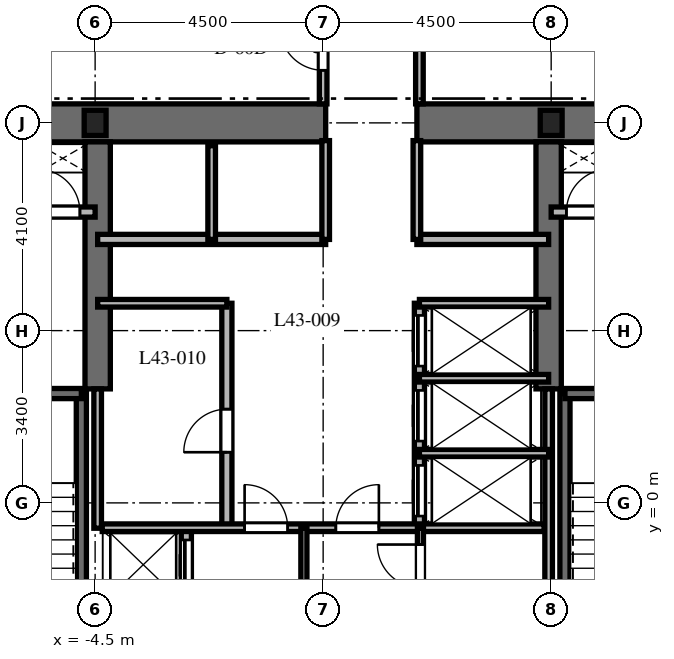
"""IFC4 building model, lengths in metres.
Left out: names, types, materials, properties, quantities, classifications, styles, units other than length and angle.
Written with IfcOpenShell. Run it as: python <this file> out.ifc"""

import sys

from ifc_helpers import new_model, si_unit, direction, frame, frame_2d, origin, origin_2d, place, context, subcontext, project, spatial, rectangle, i_section, extrude, element, fill, save


model = new_model("IFC4")
c1 = context("Model", 3, precision=1e-05, world=origin(), true_north=direction((0.0, 1.0)))
c2 = subcontext(c1, "Body", "Model", "MODEL_VIEW")
j1 = project(units=[si_unit("LENGTHUNIT", "METRE"), si_unit("PLANEANGLEUNIT", "RADIAN")], contexts=[c1])
p1 = place(None, origin())
s1 = spatial("IfcSite", under=j1, at=p1, CompositionType="ELEMENT")
p2 = place(p1, origin())
s2 = spatial("IfcBuilding", under=s1, at=p2, CompositionType="ELEMENT")
p3 = place(p2, frame((0.0, 0.0, 175.6)))
s3 = spatial("IfcBuildingStorey", under=s2, at=p3, CompositionType="ELEMENT", Elevation=175.6)
p4 = place(p3, frame((-9.375, 7.5, 0.0), z_axis=(0.0, 0.0, 1.0), x_axis=(1.0, 0.0, 0.0)))
e1 = element("IfcWall", 1, at=p4, inside=s3, PredefinedType="SHEAR", context=c2, shape_type="SweptSolid", body=[
    extrude(rectangle(XDim=9.425, YDim=0.75, at=frame_2d((4.712, 0.0))), origin(), (0.0, 0.0, 1.0), 3.7),
])
p5 = place(p3, frame((1.85, 7.5, 0.0), z_axis=(0.0, 0.0, 1.0), x_axis=(1.0, 0.0, 0.0)))
e2 = element("IfcWall", 2, at=p5, inside=s3, PredefinedType="SHEAR", context=c2, shape_type="SweptSolid", body=[
    extrude(rectangle(XDim=7.525, YDim=0.75, at=frame_2d((3.762, 0.0))), origin(), (0.0, 0.0, 1.0), 3.7),
])
for number, where, z_axis, x_axis in (
    (3, (-4.45, 2.25, 0.0), (0.0, 0.0, 1.0), (0.0, 1.0, 0.0)),
    (4, (4.45, 2.25, 0.0), (0.0, 0.0, 1.0), (0.0, 1.0, 0.0)),
):
    element("IfcWall", number, at=place(p3, frame(where, z_axis=z_axis, x_axis=x_axis)), inside=s3, PredefinedType="SHEAR", context=c2, shape_type="SweptSolid", body=[
        extrude(rectangle(XDim=4.875, YDim=0.5, at=frame_2d((2.438, 0.0))), origin(), (0.0, 0.0, 1.0), 3.7),
    ])
p6 = place(p3, frame((-4.772, -6.985, 0.0), z_axis=(0.0, 0.0, 1.0), x_axis=(0.0, 1.0, 0.0)))
e5 = element("IfcWall", 5, at=p6, inside=s3, PredefinedType="SHEAR", context=c2, shape_type="SweptSolid", body=[
    extrude(rectangle(XDim=9.143, YDim=0.2, at=frame_2d((4.572, 0.0))), origin(), (0.0, 0.0, 1.0), 3.7),
])
p7 = place(p3, frame((-8.458, 2.158, 0.0), z_axis=(0.0, 0.0, 1.0), x_axis=(1.0, 0.0, 0.0)))
e6 = element("IfcWall", 6, at=p7, inside=s3, PredefinedType="SHEAR", context=c2, shape_type="SweptSolid", body=[
    extrude(rectangle(XDim=3.686, YDim=0.2, at=frame_2d((1.843, 0.0))), origin(), (0.0, 0.0, 1.0), 3.7),
])
p8 = place(p7, frame((1.3, 0.0, 0.0)))
e7 = element("IfcOpeningElement", 7, at=p8, cuts=e6, PredefinedType="OPENING", context=c2, shape_type="SweptSolid", body=[
    extrude(rectangle(XDim=1.0, YDim=2.15, at=frame_2d((0.5, 1.075))), frame((0.0, 0.11, 0.0), z_axis=(0.0, -1.0, 0.0), x_axis=(1.0, 0.0, 0.0)), (0.0, 0.0, 1.0), 0.22),
])
p9 = place(p3, frame((4.772, -6.985, 0.0), z_axis=(0.0, 0.0, 1.0), x_axis=(0.0, 1.0, 0.0)))
e8 = element("IfcWall", 8, at=p9, inside=s3, PredefinedType="SHEAR", context=c2, shape_type="SweptSolid", body=[
    extrude(rectangle(XDim=9.143, YDim=0.2, at=frame_2d((4.572, 0.0))), origin(), (0.0, 0.0, 1.0), 3.7),
])
p10 = place(p3, frame((4.772, 2.158, 0.0), z_axis=(0.0, 0.0, 1.0), x_axis=(1.0, 0.0, 0.0)))
e9 = element("IfcWall", 9, at=p10, inside=s3, PredefinedType="SHEAR", context=c2, shape_type="SweptSolid", body=[
    extrude(rectangle(XDim=3.686, YDim=0.2, at=frame_2d((1.843, 0.0))), origin(), (0.0, 0.0, 1.0), 3.7),
])
p11 = place(p10, frame((1.35, 0.0, 0.0)))
e10 = element("IfcOpeningElement", 10, at=p11, cuts=e9, PredefinedType="OPENING", context=c2, shape_type="SweptSolid", body=[
    extrude(rectangle(XDim=1.0, YDim=2.15, at=frame_2d((0.5, 1.075))), frame((0.0, 0.11, 0.0), z_axis=(0.0, -1.0, 0.0), x_axis=(1.0, 0.0, 0.0)), (0.0, 0.0, 1.0), 0.22),
])
for number, where, z_axis, x_axis in (
    (11, (4.5, 7.5, 0.0), (0.0, 0.0, 1.0), (1.0, 0.0, 0.0)),
    (12, (-4.5, 7.5, 0.0), (0.0, 0.0, 1.0), (1.0, 0.0, 0.0)),
):
    element("IfcColumn", number, at=place(p3, frame(where, z_axis=z_axis, x_axis=x_axis)), inside=s3, PredefinedType="COLUMN", context=c2, shape_type="SweptSolid", body=[
        extrude(i_section(OverallWidth=0.432, OverallDepth=0.498, WebThickness=0.056, FlangeThickness=0.089, at=origin_2d()), origin(), (0.0, 0.0, 1.0), 3.7),
    ])
p12 = place(p3, frame((-8.55, 5.74, 0.0), z_axis=(0.0, 0.0, 1.0), x_axis=(1.0, 0.0, 0.0)))
e13 = element("IfcWall", 13, at=p12, inside=s3, PredefinedType="PARTITIONING", context=c2, shape_type="SweptSolid", body=[
    extrude(rectangle(XDim=4.05, YDim=0.2, at=frame_2d((2.025, 0.0))), origin(), (0.0, 0.0, 1.0), 3.4),
])
p13 = place(p12, frame((0.75, 0.0, 0.0)))
e14 = element("IfcOpeningElement", 14, at=p13, cuts=e13, PredefinedType="OPENING", context=c2, shape_type="SweptSolid", body=[
    extrude(rectangle(XDim=1.1, YDim=2.2, at=frame_2d((0.55, 1.1))), frame((0.0, 0.11, 0.0), z_axis=(0.0, -1.0, 0.0), x_axis=(1.0, 0.0, 0.0)), (0.0, 0.0, 1.0), 0.22),
])
p14 = place(p12, frame((2.9, 0.0, 0.0)))
e15 = element("IfcOpeningElement", 15, at=p14, cuts=e13, PredefinedType="OPENING", context=c2, shape_type="SweptSolid", body=[
    extrude(rectangle(XDim=0.85, YDim=2.03, at=frame_2d((0.425, 1.015))), frame((0.0, 0.11, 0.0), z_axis=(0.0, -1.0, 0.0), x_axis=(1.0, 0.0, 0.0)), (0.0, 0.0, 1.0), 0.22),
])
p15 = place(p3, frame((4.5, 5.74, 0.0), z_axis=(0.0, 0.0, 1.0), x_axis=(1.0, 0.0, 0.0)))
e16 = element("IfcWall", 16, at=p15, inside=s3, PredefinedType="PARTITIONING", context=c2, shape_type="SweptSolid", body=[
    extrude(rectangle(XDim=4.05, YDim=0.2, at=frame_2d((2.025, 0.0))), origin(), (0.0, 0.0, 1.0), 3.4),
])
p16 = place(p15, frame((0.3, 0.0, 0.0)))
e17 = element("IfcOpeningElement", 17, at=p16, cuts=e16, PredefinedType="OPENING", context=c2, shape_type="SweptSolid", body=[
    extrude(rectangle(XDim=0.85, YDim=2.03, at=frame_2d((0.425, 1.015))), frame((0.0, 0.11, 0.0), z_axis=(0.0, -1.0, 0.0), x_axis=(1.0, 0.0, 0.0)), (0.0, 0.0, 1.0), 0.22),
])
p17 = place(p15, frame((2.15, 0.0, 0.0)))
e18 = element("IfcOpeningElement", 18, at=p17, cuts=e16, PredefinedType="OPENING", context=c2, shape_type="SweptSolid", body=[
    extrude(rectangle(XDim=1.1, YDim=2.2, at=frame_2d((0.55, 1.1))), frame((0.0, 0.11, 0.0), z_axis=(0.0, -1.0, 0.0), x_axis=(1.0, 0.0, 0.0)), (0.0, 0.0, 1.0), 0.22),
])
p18 = place(p3, frame((-2.7, -1.972, 0.0), z_axis=(0.0, 0.0, 1.0), x_axis=(0.0, 1.0, 0.0)))
e19 = element("IfcWall", 19, at=p18, inside=s3, PredefinedType="PARTITIONING", context=c2, shape_type="SweptSolid", body=[
    extrude(rectangle(XDim=1.472, YDim=0.2, at=frame_2d((0.736, 0.0))), origin(), (0.0, 0.0, 1.0), 3.4),
])
p19 = place(p18, frame((0.24, 0.0, 0.0)))
e20 = element("IfcOpeningElement", 20, at=p19, cuts=e19, PredefinedType="OPENING", context=c2, shape_type="SweptSolid", body=[
    extrude(rectangle(XDim=1.0, YDim=2.2, at=frame_2d((0.5, 1.1))), frame((0.0, 0.11, 0.0), z_axis=(0.0, -1.0, 0.0), x_axis=(1.0, 0.0, 0.0)), (0.0, 0.0, 1.0), 0.22),
])
p20 = place(p3, frame((-4.45, 5.2, 0.0), z_axis=(0.0, 0.0, 1.0), x_axis=(1.0, 0.0, 0.0)))
e21 = element("IfcWall", 21, at=p20, inside=s3, PredefinedType="PARTITIONING", context=c2, shape_type="SweptSolid", body=[
    extrude(rectangle(XDim=4.5, YDim=0.2, at=frame_2d((2.25, 0.0))), origin(), (0.0, 0.0, 1.0), 3.4),
])
p21 = place(p3, frame((1.85, 5.2, 0.0), z_axis=(0.0, 0.0, 1.0), x_axis=(1.0, 0.0, 0.0)))
e22 = element("IfcWall", 22, at=p21, inside=s3, PredefinedType="PARTITIONING", context=c2, shape_type="SweptSolid", body=[
    extrude(rectangle(XDim=2.6, YDim=0.2, at=frame_2d((1.3, 0.0))), origin(), (0.0, 0.0, 1.0), 3.4),
])
p22 = place(p3, frame((-2.2, 5.2, 0.0), z_axis=(0.0, 0.0, 1.0), x_axis=(0.0, 1.0, 0.0)))
e23 = element("IfcWall", 23, at=p22, inside=s3, PredefinedType="PARTITIONING", context=c2, shape_type="SweptSolid", body=[
    extrude(rectangle(XDim=1.85, YDim=0.15, at=frame_2d((0.925, 0.0))), origin(), (0.0, 0.0, 1.0), 3.4),
])
for number, where, z_axis, x_axis in (
    (24, (0.05, 5.2, 0.0), (0.0, 0.0, 1.0), (0.0, 1.0, 0.0)),
    (25, (1.85, 5.2, 0.0), (0.0, 0.0, 1.0), (0.0, 1.0, 0.0)),
):
    element("IfcWall", number, at=place(p3, frame(where, z_axis=z_axis, x_axis=x_axis)), inside=s3, PredefinedType="PARTITIONING", context=c2, shape_type="SweptSolid", body=[
        extrude(rectangle(XDim=1.95, YDim=0.15, at=frame_2d((0.975, 0.0))), origin(), (0.0, 0.0, 1.0), 3.4),
    ])
p23 = place(p3, frame((-4.45, -0.5, 0.0), z_axis=(0.0, 0.0, 1.0), x_axis=(0.0, 1.0, 0.0)))
e26 = element("IfcWall", 26, at=p23, inside=s3, PredefinedType="PARTITIONING", context=c2, shape_type="SweptSolid", body=[
    extrude(rectangle(XDim=2.75, YDim=0.15, at=frame_2d((1.375, 0.0))), origin(), (0.0, 0.0, 1.0), 3.4),
])
p24 = place(p3, frame((4.45, -1.972, 0.0), z_axis=(0.0, 0.0, 1.0), x_axis=(0.0, 1.0, 0.0)))
e27 = element("IfcWall", 27, at=p24, inside=s3, PredefinedType="PARTITIONING", context=c2, shape_type="SweptSolid", body=[
    extrude(rectangle(XDim=4.222, YDim=0.15, at=frame_2d((2.111, 0.0))), origin(), (0.0, 0.0, 1.0), 3.4),
])
p25 = place(p3, frame((-1.9, -0.5, 0.0), z_axis=(0.0, 0.0, 1.0), x_axis=(0.0, 1.0, 0.0)))
e28 = element("IfcWall", 28, at=p25, inside=s3, PredefinedType="PARTITIONING", context=c2, shape_type="SweptSolid", body=[
    extrude(rectangle(XDim=4.44, YDim=0.2, at=frame_2d((2.22, 0.0))), origin(), (0.0, 0.0, 1.0), 3.4),
])
p26 = place(p25, frame((1.5, 0.0, 0.0)))
e29 = element("IfcOpeningElement", 29, at=p26, cuts=e28, PredefinedType="OPENING", context=c2, shape_type="SweptSolid", body=[
    extrude(rectangle(XDim=0.85, YDim=2.03, at=frame_2d((0.425, 1.015))), frame((0.0, 0.11, 0.0), z_axis=(0.0, -1.0, 0.0), x_axis=(1.0, 0.0, 0.0)), (0.0, 0.0, 1.0), 0.22),
])
p27 = place(p3, frame((-4.45, 3.94, 0.0), z_axis=(0.0, 0.0, 1.0), x_axis=(1.0, 0.0, 0.0)))
e30 = element("IfcWall", 30, at=p27, inside=s3, PredefinedType="PARTITIONING", context=c2, shape_type="SweptSolid", body=[
    extrude(rectangle(XDim=2.55, YDim=0.15, at=frame_2d((1.275, 0.0))), origin(), (0.0, 0.0, 1.0), 3.4),
])
p28 = place(p3, frame((1.9, -0.5, 0.0), z_axis=(0.0, 0.0, 1.0), x_axis=(0.0, 1.0, 0.0)))
e31 = element("IfcWall", 31, at=p28, inside=s3, PredefinedType="PARTITIONING", context=c2, shape_type="SweptSolid", body=[
    extrude(rectangle(XDim=4.44, YDim=0.2, at=frame_2d((2.22, 0.0))), origin(), (0.0, 0.0, 1.0), 3.4),
])
p29 = place(p28, frame((0.24, 0.0, 0.0)))
e32 = element("IfcOpeningElement", 32, at=p29, cuts=e31, PredefinedType="OPENING", context=c2, shape_type="SweptSolid", body=[
    extrude(rectangle(XDim=1.0, YDim=2.2, at=frame_2d((0.5, 1.1))), frame((0.0, 0.11, 0.0), z_axis=(0.0, -1.0, 0.0), x_axis=(1.0, 0.0, 0.0)), (0.0, 0.0, 1.0), 0.22),
])
p30 = place(p28, frame((1.72, 0.0, 0.0)))
e33 = element("IfcOpeningElement", 33, at=p30, cuts=e31, PredefinedType="OPENING", context=c2, shape_type="SweptSolid", body=[
    extrude(rectangle(XDim=1.0, YDim=2.2, at=frame_2d((0.5, 1.1))), frame((0.0, 0.11, 0.0), z_axis=(0.0, -1.0, 0.0), x_axis=(1.0, 0.0, 0.0)), (0.0, 0.0, 1.0), 0.22),
])
p31 = place(p28, frame((3.2, 0.0, 0.0)))
e34 = element("IfcOpeningElement", 34, at=p31, cuts=e31, PredefinedType="OPENING", context=c2, shape_type="SweptSolid", body=[
    extrude(rectangle(XDim=1.0, YDim=2.2, at=frame_2d((0.5, 1.1))), frame((0.0, 0.11, 0.0), z_axis=(0.0, -1.0, 0.0), x_axis=(1.0, 0.0, 0.0)), (0.0, 0.0, 1.0), 0.22),
])
for number, where, z_axis, x_axis in (
    (35, (1.9, 3.94, 0.0), (0.0, 0.0, 1.0), (1.0, 0.0, 0.0)),
    (36, (1.9, 0.98, 0.0), (0.0, 0.0, 1.0), (1.0, 0.0, 0.0)),
    (37, (1.9, 2.46, 0.0), (0.0, 0.0, 1.0), (1.0, 0.0, 0.0)),
):
    element("IfcWall", number, at=place(p3, frame(where, z_axis=z_axis, x_axis=x_axis)), inside=s3, PredefinedType="PARTITIONING", context=c2, shape_type="SweptSolid", body=[
        extrude(rectangle(XDim=2.55, YDim=0.15, at=frame_2d((1.275, 0.0))), origin(), (0.0, 0.0, 1.0), 3.4),
    ])
p32 = place(p3, frame((-4.36, -0.49, 0.0), z_axis=(0.0, 0.0, 1.0), x_axis=(1.0, 0.0, 0.0)))
e38 = element("IfcWall", 38, at=p32, inside=s3, PredefinedType="PARTITIONING", context=c2, shape_type="SweptSolid", body=[
    extrude(rectangle(XDim=8.72, YDim=0.15, at=frame_2d((4.36, 0.0))), origin(), (0.0, 0.0, 1.0), 3.4),
])
p33 = place(p32, frame((2.81, 0.0, 0.0)))
e39 = element("IfcOpeningElement", 39, at=p33, cuts=e38, PredefinedType="OPENING", context=c2, shape_type="SweptSolid", body=[
    extrude(rectangle(XDim=0.85, YDim=2.03, at=frame_2d((0.425, 1.015))), frame((0.0, 0.085, 0.0), z_axis=(0.0, -1.0, 0.0), x_axis=(1.0, 0.0, 0.0)), (0.0, 0.0, 1.0), 0.17),
])
p34 = place(p32, frame((4.61, 0.0, 0.0)))
e40 = element("IfcOpeningElement", 40, at=p34, cuts=e38, PredefinedType="OPENING", context=c2, shape_type="SweptSolid", body=[
    extrude(rectangle(XDim=0.85, YDim=2.03, at=frame_2d((0.425, 1.015))), frame((0.0, 0.085, 0.0), z_axis=(0.0, -1.0, 0.0), x_axis=(1.0, 0.0, 0.0)), (0.0, 0.0, 1.0), 0.17),
])
p35 = place(p3, frame((-0.38, -1.972, 0.0), z_axis=(0.0, 0.0, 1.0), x_axis=(0.0, 1.0, 0.0)))
e41 = element("IfcWall", 41, at=p35, inside=s3, PredefinedType="PARTITIONING", context=c2, shape_type="SweptSolid", body=[
    extrude(rectangle(XDim=1.472, YDim=0.12, at=frame_2d((0.736, 0.0))), origin(), (0.0, 0.0, 1.0), 3.4),
])
p36 = place(p3, frame((1.92, -1.972, 0.0), z_axis=(0.0, 0.0, 1.0), x_axis=(0.0, 1.0, 0.0)))
e42 = element("IfcWall", 42, at=p36, inside=s3, PredefinedType="PARTITIONING", context=c2, shape_type="SweptSolid", body=[
    extrude(rectangle(XDim=1.472, YDim=0.12, at=frame_2d((0.736, 0.0))), origin(), (0.0, 0.0, 1.0), 3.4),
])
p37 = place(p36, frame((0.3, 0.0, 0.0)))
e43 = element("IfcOpeningElement", 43, at=p37, cuts=e42, PredefinedType="OPENING", context=c2, shape_type="SweptSolid", body=[
    extrude(rectangle(XDim=0.85, YDim=2.03, at=frame_2d((0.425, 1.015))), frame((0.0, 0.07, 0.0), z_axis=(0.0, -1.0, 0.0), x_axis=(1.0, 0.0, 0.0)), (0.0, 0.0, 1.0), 0.14),
])
p38 = place(p3, frame((1.9, 10.05, 0.0), z_axis=(0.0, 0.0, 1.0), x_axis=(0.0, -1.0, 0.0)))
e44 = element("IfcWall", 44, at=p38, inside=s3, PredefinedType="PARTITIONING", context=c2, shape_type="SweptSolid", body=[
    extrude(rectangle(XDim=2.175, YDim=0.15, at=frame_2d((1.087, 0.0))), origin(), (0.0, 0.0, 1.0), 3.4),
])
p39 = place(p3, frame((0.0, 7.875, 0.0), z_axis=(0.0, 0.0, 1.0), x_axis=(0.0, 1.0, 0.0)))
e45 = element("IfcWall", 45, at=p39, inside=s3, PredefinedType="PARTITIONING", context=c2, shape_type="SweptSolid", body=[
    extrude(rectangle(XDim=2.175, YDim=0.15, at=frame_2d((1.087, 0.0))), origin(), (0.0, 0.0, 1.0), 3.4),
])
p40 = place(p39, frame((0.663, 0.0, 0.0)))
e46 = element("IfcOpeningElement", 46, at=p40, cuts=e45, PredefinedType="OPENING", context=c2, shape_type="SweptSolid", body=[
    extrude(rectangle(XDim=0.85, YDim=2.03, at=frame_2d((0.425, 1.015))), frame((0.0, 0.085, 0.0), z_axis=(0.0, -1.0, 0.0), x_axis=(1.0, 0.0, 0.0)), (0.0, 0.0, 1.0), 0.17),
])
p41 = place(p14, origin())
e47 = element("IfcDoor", 47, at=p41, inside=s3, OperationType="SINGLE_SWING_LEFT", PredefinedType="DOOR", context=c2, shape_type="SweptSolid", body=[
    extrude(rectangle(XDim=0.85, YDim=2.03, at=frame_2d((0.425, 1.015))), frame((0.0, 0.025, 0.0), z_axis=(0.0, -1.0, 0.0), x_axis=(1.0, 0.0, 0.0)), (0.0, 0.0, 1.0), 0.05),
])
fill(e15, e47)
p42 = place(p16, origin())
e48 = element("IfcDoor", 48, at=p42, inside=s3, OperationType="SINGLE_SWING_RIGHT", PredefinedType="DOOR", context=c2, shape_type="SweptSolid", body=[
    extrude(rectangle(XDim=0.85, YDim=2.03, at=frame_2d((0.425, 1.015))), frame((0.0, 0.025, 0.0), z_axis=(0.0, -1.0, 0.0), x_axis=(1.0, 0.0, 0.0)), (0.0, 0.0, 1.0), 0.05),
])
fill(e17, e48)
p43 = place(p19, origin())
e49 = element("IfcDoor", 49, at=p43, inside=s3, OperationType="SLIDING_TO_LEFT", PredefinedType="DOOR", context=c2, shape_type="SweptSolid", body=[
    extrude(rectangle(XDim=1.0, YDim=2.2, at=frame_2d((0.5, 1.1))), frame((0.0, 0.025, 0.0), z_axis=(0.0, -1.0, 0.0), x_axis=(1.0, 0.0, 0.0)), (0.0, 0.0, 1.0), 0.05),
])
fill(e20, e49)
p44 = place(p26, origin())
e50 = element("IfcDoor", 50, at=p44, inside=s3, OperationType="SINGLE_SWING_LEFT", PredefinedType="DOOR", context=c2, shape_type="SweptSolid", body=[
    extrude(rectangle(XDim=0.85, YDim=2.03, at=frame_2d((0.425, 1.015))), frame((0.0, 0.025, 0.0), z_axis=(0.0, -1.0, 0.0), x_axis=(1.0, 0.0, 0.0)), (0.0, 0.0, 1.0), 0.05),
])
fill(e29, e50)
p45 = place(p29, origin())
e51 = element("IfcDoor", 51, at=p45, inside=s3, OperationType="SLIDING_TO_RIGHT", PredefinedType="DOOR", context=c2, shape_type="SweptSolid", body=[
    extrude(rectangle(XDim=1.0, YDim=2.2, at=frame_2d((0.5, 1.1))), frame((0.0, 0.025, 0.0), z_axis=(0.0, -1.0, 0.0), x_axis=(1.0, 0.0, 0.0)), (0.0, 0.0, 1.0), 0.05),
])
fill(e32, e51)
p46 = place(p30, origin())
e52 = element("IfcDoor", 52, at=p46, inside=s3, OperationType="SLIDING_TO_RIGHT", PredefinedType="DOOR", context=c2, shape_type="SweptSolid", body=[
    extrude(rectangle(XDim=1.0, YDim=2.2, at=frame_2d((0.5, 1.1))), frame((0.0, 0.025, 0.0), z_axis=(0.0, -1.0, 0.0), x_axis=(1.0, 0.0, 0.0)), (0.0, 0.0, 1.0), 0.05),
])
fill(e33, e52)
p47 = place(p31, origin())
e53 = element("IfcDoor", 53, at=p47, inside=s3, OperationType="SLIDING_TO_RIGHT", PredefinedType="DOOR", context=c2, shape_type="SweptSolid", body=[
    extrude(rectangle(XDim=1.0, YDim=2.2, at=frame_2d((0.5, 1.1))), frame((0.0, 0.025, 0.0), z_axis=(0.0, -1.0, 0.0), x_axis=(1.0, 0.0, 0.0)), (0.0, 0.0, 1.0), 0.05),
])
fill(e34, e53)
p48 = place(p33, origin())
e54 = element("IfcDoor", 54, at=p48, inside=s3, OperationType="SINGLE_SWING_LEFT", PredefinedType="DOOR", context=c2, shape_type="SweptSolid", body=[
    extrude(rectangle(XDim=0.85, YDim=2.03, at=frame_2d((0.425, 1.015))), frame((0.0, 0.025, 0.0), z_axis=(0.0, -1.0, 0.0), x_axis=(1.0, 0.0, 0.0)), (0.0, 0.0, 1.0), 0.05),
])
fill(e39, e54)
p49 = place(p34, origin())
e55 = element("IfcDoor", 55, at=p49, inside=s3, OperationType="SINGLE_SWING_RIGHT", PredefinedType="DOOR", context=c2, shape_type="SweptSolid", body=[
    extrude(rectangle(XDim=0.85, YDim=2.03, at=frame_2d((0.425, 1.015))), frame((0.0, 0.025, 0.0), z_axis=(0.0, -1.0, 0.0), x_axis=(1.0, 0.0, 0.0)), (0.0, 0.0, 1.0), 0.05),
])
fill(e40, e55)
p50 = place(p37, origin())
e56 = element("IfcDoor", 56, at=p50, inside=s3, OperationType="SINGLE_SWING_RIGHT", PredefinedType="DOOR", context=c2, shape_type="SweptSolid", body=[
    extrude(rectangle(XDim=0.85, YDim=2.03, at=frame_2d((0.425, 1.015))), frame((0.0, 0.025, 0.0), z_axis=(0.0, -1.0, 0.0), x_axis=(1.0, 0.0, 0.0)), (0.0, 0.0, 1.0), 0.05),
])
fill(e43, e56)
p51 = place(p40, origin())
e57 = element("IfcDoor", 57, at=p51, inside=s3, OperationType="SINGLE_SWING_RIGHT", PredefinedType="DOOR", context=c2, shape_type="SweptSolid", body=[
    extrude(rectangle(XDim=0.85, YDim=2.03, at=frame_2d((0.425, 1.015))), frame((0.0, 0.025, 0.0), z_axis=(0.0, -1.0, 0.0), x_axis=(1.0, 0.0, 0.0)), (0.0, 0.0, 1.0), 0.05),
])
fill(e46, e57)
save(model, sys.argv[1])
